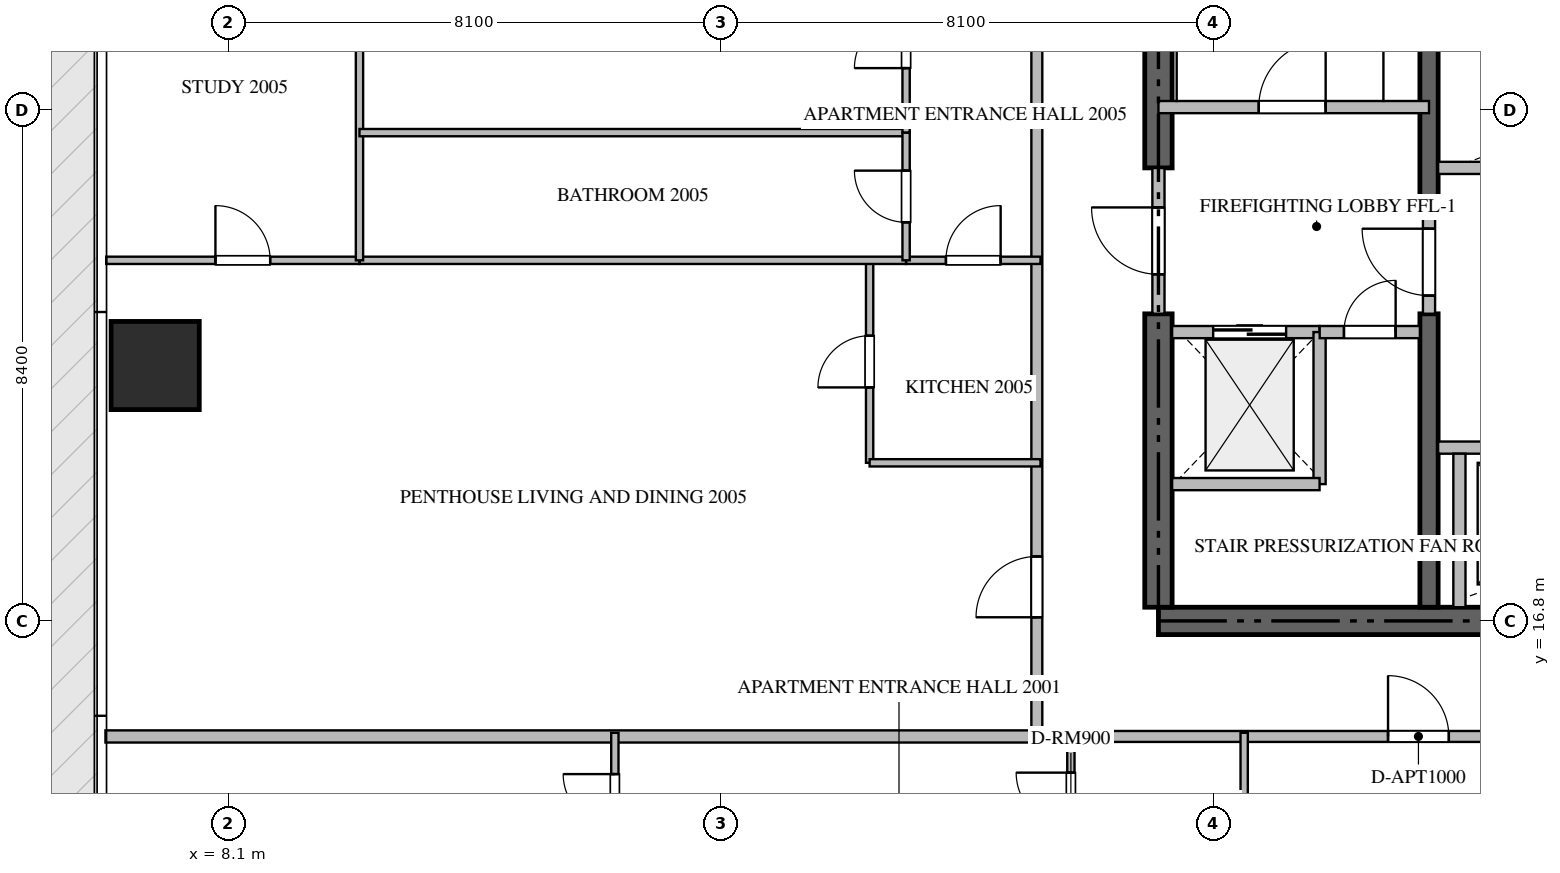
"""IFC4 building model, lengths in metres.
Left out: names, types, materials, properties, quantities, classifications, styles, units other than length and angle.
Written with IfcOpenShell. Run it as: python <this file> out.ifc"""

import sys

from ifc_helpers import new_model, si_unit, direction, frame, frame_2d, origin, origin_2d, place, context, subcontext, project, spatial, rectangle, extrude, source, transform, mapped, element, fill, save


model = new_model("IFC4")
c1 = context("Model", 3, precision=1e-05, world=origin(), true_north=direction((0.0, 1.0)))
c2 = subcontext(c1, "Body", "Model", "MODEL_VIEW")
j1 = project(units=[si_unit("LENGTHUNIT", "METRE"), si_unit("PLANEANGLEUNIT", "RADIAN")], contexts=[c1])
p1 = place(None, origin())
s1 = spatial("IfcSite", under=j1, at=p1, CompositionType="ELEMENT")
p2 = place(p1, origin())
s2 = spatial("IfcBuilding", under=s1, at=p2, CompositionType="ELEMENT")
p3 = place(p2, frame((0.0, 0.0, 82.95)))
s3 = spatial("IfcBuildingStorey", under=s2, at=p3, CompositionType="ELEMENT", Elevation=82.95)
p4 = place(p3, frame((23.4, 16.8, -0.26), z_axis=(0.0, 0.0, 1.0), x_axis=(1.0, 0.0, 0.0)))
e1 = element("IfcWall", 1, at=p4, inside=s3, PredefinedType="SHEAR", context=c2, shape_type="SweptSolid", body=[
    extrude(rectangle(XDim=18.0, YDim=0.45, at=frame_2d((9.0, 0.0))), origin(), (0.0, 0.0, 1.0), 3.748),
])
p5 = place(p3, frame((23.4, 17.025, -0.26), z_axis=(0.0, 0.0, 1.0), x_axis=(0.0, 1.0, 0.0)))
e2 = element("IfcWall", 2, at=p5, inside=s3, PredefinedType="SHEAR", context=c2, shape_type="SweptSolid", body=[
    extrude(rectangle(XDim=4.825, YDim=0.45, at=frame_2d((2.413, 0.0))), origin(), (0.0, 0.0, 1.0), 3.748),
])
p6 = place(p3, frame((23.4, 24.25, -0.26), z_axis=(0.0, 0.0, 1.0), x_axis=(0.0, 1.0, 0.0)))
e3 = element("IfcWall", 3, at=p6, inside=s3, PredefinedType="SHEAR", context=c2, shape_type="SweptSolid", body=[
    extrude(rectangle(XDim=9.125, YDim=0.45, at=frame_2d((4.562, 0.0))), origin(), (0.0, 0.0, 1.0), 3.748),
])
p7 = place(p3, frame((27.85, 17.025, -0.26), z_axis=(0.0, 0.0, 1.0), x_axis=(0.0, 1.0, 0.0)))
e4 = element("IfcWall", 4, at=p7, inside=s3, PredefinedType="SHEAR", context=c2, shape_type="SweptSolid", body=[
    extrude(rectangle(XDim=4.825, YDim=0.3, at=frame_2d((2.413, 0.0))), origin(), (0.0, 0.0, 1.0), 3.748),
])
p8 = place(p3, frame((27.85, 23.55, -0.26), z_axis=(0.0, 0.0, 1.0), x_axis=(0.0, 1.0, 0.0)))
e5 = element("IfcWall", 5, at=p8, inside=s3, PredefinedType="SHEAR", context=c2, shape_type="SweptSolid", body=[
    extrude(rectangle(XDim=9.825, YDim=0.3, at=frame_2d((4.913, 0.0))), origin(), (0.0, 0.0, 1.0), 3.748),
])
m1 = source(origin(), c2, "Body", "SweptSolid", [
    extrude(rectangle(XDim=1.45, YDim=1.45, at=origin_2d()), origin(), (0.0, 0.0, 1.0), 3.75),
])
p9 = place(p3, frame((6.9, 21.0, -0.26), z_axis=(0.0, 0.0, 1.0), x_axis=(1.0, 0.0, 0.0)))
e6 = element("IfcColumn", 6, at=p9, inside=s3, PredefinedType="COLUMN", context=c2, shape_type="MappedRepresentation", body=[
    mapped(m1, transform((0.0, 0.0, 0.0), scale=1.0)),
])
p10 = place(p3, frame((23.4, 25.25, 0.0), z_axis=(0.0, 0.0, 1.0), x_axis=(1.0, 0.0, 0.0)))
e7 = element("IfcWall", 7, at=p10, inside=s3, PredefinedType="STANDARD", context=c2, shape_type="SweptSolid", body=[
    extrude(rectangle(XDim=4.45, YDim=0.2, at=frame_2d((2.225, 0.0))), origin(), (0.0, 0.0, 1.0), 3.49),
])
p11 = place(p10, frame((1.65, 0.0, 0.0)))
e8 = element("IfcOpeningElement", 8, at=p11, cuts=e7, PredefinedType="OPENING", context=c2, shape_type="SweptSolid", body=[
    extrude(rectangle(XDim=1.1, YDim=2.15, at=frame_2d((0.55, 1.075))), frame((0.0, 0.11, 0.0), z_axis=(0.0, -1.0, 0.0), x_axis=(1.0, 0.0, 0.0)), (0.0, 0.0, 1.0), 0.22),
])
p12 = place(p3, frame((23.625, 21.55, 0.0), z_axis=(0.0, 0.0, 1.0), x_axis=(1.0, 0.0, 0.0)))
e9 = element("IfcWall", 9, at=p12, inside=s3, PredefinedType="STANDARD", context=c2, shape_type="SweptSolid", body=[
    extrude(rectangle(XDim=2.425, YDim=0.2, at=frame_2d((1.212, 0.0))), origin(), (0.0, 0.0, 1.0), 3.49),
])
p13 = place(p12, frame((0.675, 0.0, 0.0)))
e10 = element("IfcOpeningElement", 10, at=p13, cuts=e9, PredefinedType="OPENING", context=c2, shape_type="SweptSolid", body=[
    extrude(rectangle(XDim=1.2, YDim=2.2, at=frame_2d((0.6, 1.1))), frame((0.0, 0.11, 0.0), z_axis=(0.0, -1.0, 0.0), x_axis=(1.0, 0.0, 0.0)), (0.0, 0.0, 1.0), 0.22),
])
p14 = place(p3, frame((28.0, 19.65, 0.0), z_axis=(0.0, 0.0, 1.0), x_axis=(1.0, 0.0, 0.0)))
e11 = element("IfcWall", 11, at=p14, inside=s3, PredefinedType="STANDARD", context=c2, shape_type="SweptSolid", body=[
    extrude(rectangle(XDim=2.65, YDim=0.2, at=frame_2d((1.325, 0.0))), origin(), (0.0, 0.0, 1.0), 3.49),
])
p15 = place(p14, frame((0.9, 0.0, 0.0)))
e12 = element("IfcOpeningElement", 12, at=p15, cuts=e11, PredefinedType="OPENING", context=c2, shape_type="SweptSolid", body=[
    extrude(rectangle(XDim=1.1, YDim=2.2, at=frame_2d((0.55, 1.1))), frame((0.0, 0.11, 0.0), z_axis=(0.0, -1.0, 0.0), x_axis=(1.0, 0.0, 0.0)), (0.0, 0.0, 1.0), 0.22),
])
p16 = place(p3, frame((28.35, 17.025, 0.0), z_axis=(0.0, 0.0, 1.0), x_axis=(0.0, 1.0, 0.0)))
e13 = element("IfcWall", 13, at=p16, inside=s3, PredefinedType="STANDARD", context=c2, shape_type="SweptSolid", body=[
    extrude(rectangle(XDim=2.525, YDim=0.2, at=frame_2d((1.263, 0.0))), origin(), (0.0, 0.0, 1.0), 3.49),
])
p17 = place(p3, frame((28.0, 24.25, 0.0), z_axis=(0.0, 0.0, 1.0), x_axis=(1.0, 0.0, 0.0)))
e14 = element("IfcWall", 14, at=p17, inside=s3, PredefinedType="STANDARD", context=c2, shape_type="SweptSolid", body=[
    extrude(rectangle(XDim=2.425, YDim=0.2, at=frame_2d((1.212, 0.0))), origin(), (0.0, 0.0, 1.0), 3.49),
])
p18 = place(p3, frame((26.05, 19.05, 0.0), z_axis=(0.0, 0.0, 1.0), x_axis=(0.0, 1.0, 0.0)))
e15 = element("IfcWall", 15, at=p18, inside=s3, PredefinedType="STANDARD", context=c2, shape_type="SweptSolid", body=[
    extrude(rectangle(XDim=2.5, YDim=0.2, at=frame_2d((1.25, 0.0))), origin(), (0.0, 0.0, 1.0), 3.49),
])
p19 = place(p3, frame((23.625, 19.05, 0.0), z_axis=(0.0, 0.0, 1.0), x_axis=(1.0, 0.0, 0.0)))
e16 = element("IfcWall", 16, at=p19, inside=s3, PredefinedType="STANDARD", context=c2, shape_type="SweptSolid", body=[
    extrude(rectangle(XDim=2.425, YDim=0.2, at=frame_2d((1.212, 0.0))), origin(), (0.0, 0.0, 1.0), 3.49),
])
p20 = place(p3, frame((26.052, 21.55, 0.0), z_axis=(0.0, 0.0, 1.0), x_axis=(1.0, 0.0, 0.0)))
e17 = element("IfcWall", 17, at=p20, inside=s3, PredefinedType="STANDARD", context=c2, shape_type="SweptSolid", body=[
    extrude(rectangle(XDim=1.648, YDim=0.2, at=frame_2d((0.824, 0.0))), origin(), (0.0, 0.0, 1.0), 3.49),
])
p21 = place(p20, frame((0.399, 0.0, 0.0)))
e18 = element("IfcOpeningElement", 18, at=p21, cuts=e17, PredefinedType="OPENING", context=c2, shape_type="SweptSolid", body=[
    extrude(rectangle(XDim=0.85, YDim=2.1, at=frame_2d((0.425, 1.05))), frame((0.0, 0.11, 0.0), z_axis=(0.0, -1.0, 0.0), x_axis=(1.0, 0.0, 0.0)), (0.0, 0.0, 1.0), 0.22),
])
p22 = place(p3, frame((23.4, 21.852, 0.0), z_axis=(0.0, 0.0, 1.0), x_axis=(0.0, 1.0, 0.0)))
e19 = element("IfcWall", 19, at=p22, inside=s3, PredefinedType="STANDARD", context=c2, shape_type="SweptSolid", body=[
    extrude(rectangle(XDim=2.396, YDim=0.2, at=frame_2d((1.198, 0.0))), origin(), (0.0, 0.0, 1.0), 3.49),
])
p23 = place(p22, frame((0.648, 0.0, 0.0)))
e20 = element("IfcOpeningElement", 20, at=p23, cuts=e19, PredefinedType="OPENING", context=c2, shape_type="SweptSolid", body=[
    extrude(rectangle(XDim=1.1, YDim=2.15, at=frame_2d((0.55, 1.075))), frame((0.0, 0.11, 0.0), z_axis=(0.0, -1.0, 0.0), x_axis=(1.0, 0.0, 0.0)), (0.0, 0.0, 1.0), 0.22),
])
p24 = place(p3, frame((27.85, 21.852, 0.0), z_axis=(0.0, 0.0, 1.0), x_axis=(0.0, 1.0, 0.0)))
e21 = element("IfcWall", 21, at=p24, inside=s3, PredefinedType="STANDARD", context=c2, shape_type="SweptSolid", body=[
    extrude(rectangle(XDim=1.696, YDim=0.2, at=frame_2d((0.848, 0.0))), origin(), (0.0, 0.0, 1.0), 3.49),
])
p25 = place(p24, frame((0.298, 0.0, 0.0)))
e22 = element("IfcOpeningElement", 22, at=p25, cuts=e21, PredefinedType="OPENING", context=c2, shape_type="SweptSolid", body=[
    extrude(rectangle(XDim=1.1, YDim=2.15, at=frame_2d((0.55, 1.075))), frame((0.0, 0.11, 0.0), z_axis=(0.0, -1.0, 0.0), x_axis=(1.0, 0.0, 0.0)), (0.0, 0.0, 1.0), 0.22),
])
p26 = place(p3, frame((6.082, 14.9, 0.0), z_axis=(0.0, 0.0, 1.0), x_axis=(1.0, 0.0, 0.0)))
e23 = element("IfcWall", 23, at=p26, inside=s3, PredefinedType="PARTITIONING", context=c2, shape_type="SweptSolid", body=[
    extrude(rectangle(XDim=15.318, YDim=0.2, at=frame_2d((7.659, 0.0))), origin(), (0.0, 0.0, 1.0), 3.49),
])
p27 = place(p3, frame((21.402, 14.9, 0.0), z_axis=(0.0, 0.0, 1.0), x_axis=(1.0, 0.0, 0.0)))
e24 = element("IfcWall", 24, at=p27, inside=s3, PredefinedType="PARTITIONING", context=c2, shape_type="SweptSolid", body=[
    extrude(rectangle(XDim=21.996, YDim=0.18, at=frame_2d((10.998, 0.0))), origin(), (0.0, 0.0, 1.0), 3.49),
])
p28 = place(p27, frame((5.774, 0.0, 0.0)))
e25 = element("IfcOpeningElement", 25, at=p28, cuts=e24, PredefinedType="OPENING", context=c2, shape_type="SweptSolid", body=[
    extrude(rectangle(XDim=1.0, YDim=2.15, at=frame_2d((0.5, 1.075))), frame((0.0, 0.1, 0.0), z_axis=(0.0, -1.0, 0.0), x_axis=(1.0, 0.0, 0.0)), (0.0, 0.0, 1.0), 0.2),
])
p29 = place(p27, frame((16.272, 0.0, 0.0)))
e26 = element("IfcOpeningElement", 26, at=p29, cuts=e24, PredefinedType="OPENING", context=c2, shape_type="SweptSolid", body=[
    extrude(rectangle(XDim=1.0, YDim=2.15, at=frame_2d((0.5, 1.075))), frame((0.0, 0.1, 0.0), z_axis=(0.0, -1.0, 0.0), x_axis=(1.0, 0.0, 0.0)), (0.0, 0.0, 1.0), 0.2),
])
p30 = place(p3, frame((21.4, 14.9, 0.0), z_axis=(0.0, 0.0, 1.0), x_axis=(0.0, 1.0, 0.0)))
e27 = element("IfcWall", 27, at=p30, inside=s3, PredefinedType="PARTITIONING", context=c2, shape_type="SweptSolid", body=[
    extrude(rectangle(XDim=20.6, YDim=0.18, at=frame_2d((10.3, 0.0))), origin(), (0.0, 0.0, 1.0), 3.49),
])
p31 = place(p30, frame((1.96, 0.0, 0.0)))
e28 = element("IfcOpeningElement", 28, at=p31, cuts=e27, PredefinedType="OPENING", context=c2, shape_type="SweptSolid", body=[
    extrude(rectangle(XDim=1.0, YDim=2.15, at=frame_2d((0.5, 1.075))), frame((0.0, 0.1, 0.0), z_axis=(0.0, -1.0, 0.0), x_axis=(1.0, 0.0, 0.0)), (0.0, 0.0, 1.0), 0.2),
])
p32 = place(p3, frame((24.81, 12.15, 0.0), z_axis=(0.0, 0.0, 1.0), x_axis=(0.0, 1.0, 0.0)))
e29 = element("IfcWall", 29, at=p32, inside=s3, PredefinedType="PARTITIONING", context=c2, shape_type="SweptSolid", body=[
    extrude(rectangle(XDim=2.81, YDim=0.12, at=frame_2d((1.405, 0.0))), origin(), (0.0, 0.0, 1.0), 3.49),
])
p33 = place(p3, frame((21.96, 12.75, 0.0), z_axis=(0.0, 0.0, 1.0), x_axis=(0.0, 1.0, 0.0)))
e30 = element("IfcWall", 30, at=p33, inside=s3, PredefinedType="PARTITIONING", context=c2, shape_type="SweptSolid", body=[
    extrude(rectangle(XDim=2.21, YDim=0.12, at=frame_2d((1.105, 0.0))), origin(), (0.0, 0.0, 1.0), 3.49),
])
p34 = place(p33, frame((0.655, 0.0, 0.0)))
e31 = element("IfcOpeningElement", 31, at=p34, cuts=e30, PredefinedType="OPENING", context=c2, shape_type="SweptSolid", body=[
    extrude(rectangle(XDim=0.9, YDim=2.1, at=frame_2d((0.45, 1.05))), frame((0.0, 0.07, 0.0), z_axis=(0.0, -1.0, 0.0), x_axis=(1.0, 0.0, 0.0)), (0.0, 0.0, 1.0), 0.14),
])
p35 = place(p3, frame((14.46, 12.752, 0.0), z_axis=(0.0, 0.0, 1.0), x_axis=(0.0, 1.0, 0.0)))
e32 = element("IfcWall", 32, at=p35, inside=s3, PredefinedType="PARTITIONING", context=c2, shape_type="SweptSolid", body=[
    extrude(rectangle(XDim=2.208, YDim=0.12, at=frame_2d((1.104, 0.0))), origin(), (0.0, 0.0, 1.0), 3.49),
])
p36 = place(p35, frame((0.679, 0.0, 0.0)))
e33 = element("IfcOpeningElement", 33, at=p36, cuts=e32, PredefinedType="OPENING", context=c2, shape_type="SweptSolid", body=[
    extrude(rectangle(XDim=0.85, YDim=2.1, at=frame_2d((0.425, 1.05))), frame((0.0, 0.07, 0.0), z_axis=(0.0, -1.0, 0.0), x_axis=(1.0, 0.0, 0.0)), (0.0, 0.0, 1.0), 0.14),
])
p37 = place(p3, frame((18.65, 19.4, 0.0), z_axis=(0.0, 0.0, 1.0), x_axis=(0.0, 1.0, 0.0)))
e34 = element("IfcWall", 34, at=p37, inside=s3, PredefinedType="PARTITIONING", context=c2, shape_type="SweptSolid", body=[
    extrude(rectangle(XDim=3.33, YDim=0.12, at=frame_2d((1.665, 0.0))), origin(), (0.0, 0.0, 1.0), 3.49),
])
p38 = place(p37, frame((1.24, 0.0, 0.0)))
e35 = element("IfcOpeningElement", 35, at=p38, cuts=e34, PredefinedType="OPENING", context=c2, shape_type="SweptSolid", body=[
    extrude(rectangle(XDim=0.85, YDim=2.1, at=frame_2d((0.425, 1.05))), frame((0.0, 0.07, 0.0), z_axis=(0.0, -1.0, 0.0), x_axis=(1.0, 0.0, 0.0)), (0.0, 0.0, 1.0), 0.14),
])
p39 = place(p3, frame((18.65, 19.4, 0.0), z_axis=(0.0, 0.0, 1.0), x_axis=(1.0, 0.0, 0.0)))
e36 = element("IfcWall", 36, at=p39, inside=s3, PredefinedType="PARTITIONING", context=c2, shape_type="SweptSolid", body=[
    extrude(rectangle(XDim=2.81, YDim=0.12, at=frame_2d((1.405, 0.0))), origin(), (0.0, 0.0, 1.0), 3.49),
])
p40 = place(p3, frame((19.25, 22.73, 0.0), z_axis=(0.0, 0.0, 1.0), x_axis=(1.0, 0.0, 0.0)))
e37 = element("IfcWall", 37, at=p40, inside=s3, PredefinedType="PARTITIONING", context=c2, shape_type="SweptSolid", body=[
    extrude(rectangle(XDim=2.21, YDim=0.12, at=frame_2d((1.105, 0.0))), origin(), (0.0, 0.0, 1.0), 3.49),
])
p41 = place(p40, frame((0.655, 0.0, 0.0)))
e38 = element("IfcOpeningElement", 38, at=p41, cuts=e37, PredefinedType="OPENING", context=c2, shape_type="SweptSolid", body=[
    extrude(rectangle(XDim=0.9, YDim=2.1, at=frame_2d((0.45, 1.05))), frame((0.0, 0.07, 0.0), z_axis=(0.0, -1.0, 0.0), x_axis=(1.0, 0.0, 0.0)), (0.0, 0.0, 1.0), 0.14),
])
p42 = place(p3, frame((6.095, 22.73, 0.0), z_axis=(0.0, 0.0, 1.0), x_axis=(1.0, 0.0, 0.0)))
e39 = element("IfcWall", 39, at=p42, inside=s3, PredefinedType="PARTITIONING", context=c2, shape_type="SweptSolid", body=[
    extrude(rectangle(XDim=4.165, YDim=0.12, at=frame_2d((2.083, 0.0))), origin(), (0.0, 0.0, 1.0), 3.49),
])
p43 = place(p42, frame((1.796, 0.0, 0.0)))
e40 = element("IfcOpeningElement", 40, at=p43, cuts=e39, PredefinedType="OPENING", context=c2, shape_type="SweptSolid", body=[
    extrude(rectangle(XDim=0.9, YDim=2.1, at=frame_2d((0.45, 1.05))), frame((0.0, 0.07, 0.0), z_axis=(0.0, -1.0, 0.0), x_axis=(1.0, 0.0, 0.0)), (0.0, 0.0, 1.0), 0.14),
])
p44 = place(p3, frame((10.262, 22.73, 0.0), z_axis=(0.0, 0.0, 1.0), x_axis=(1.0, 0.0, 0.0)))
e41 = element("IfcWall", 41, at=p44, inside=s3, PredefinedType="PARTITIONING", context=c2, shape_type="SweptSolid", body=[
    extrude(rectangle(XDim=8.986, YDim=0.12, at=frame_2d((4.493, 0.0))), origin(), (0.0, 0.0, 1.0), 3.49),
])
p45 = place(p3, frame((10.26, 22.73, 0.0), z_axis=(0.0, 0.0, 1.0), x_axis=(0.0, 1.0, 0.0)))
e42 = element("IfcWall", 42, at=p45, inside=s3, PredefinedType="PARTITIONING", context=c2, shape_type="SweptSolid", body=[
    extrude(rectangle(XDim=5.07, YDim=0.12, at=frame_2d((2.535, 0.0))), origin(), (0.0, 0.0, 1.0), 3.49),
])
p46 = place(p3, frame((10.26, 24.83, 0.0), z_axis=(0.0, 0.0, 1.0), x_axis=(1.0, 0.0, 0.0)))
e43 = element("IfcWall", 43, at=p46, inside=s3, PredefinedType="PARTITIONING", context=c2, shape_type="SweptSolid", body=[
    extrude(rectangle(XDim=8.99, YDim=0.12, at=frame_2d((4.495, 0.0))), origin(), (0.0, 0.0, 1.0), 3.49),
])
p47 = place(p3, frame((19.25, 22.73, 0.0), z_axis=(0.0, 0.0, 1.0), x_axis=(0.0, 1.0, 0.0)))
e44 = element("IfcWall", 44, at=p47, inside=s3, PredefinedType="PARTITIONING", context=c2, shape_type="SweptSolid", body=[
    extrude(rectangle(XDim=2.1, YDim=0.12, at=frame_2d((1.05, 0.0))), origin(), (0.0, 0.0, 1.0), 3.49),
])
p48 = place(p47, frame((0.625, 0.0, 0.0)))
e45 = element("IfcOpeningElement", 45, at=p48, cuts=e44, PredefinedType="OPENING", context=c2, shape_type="SweptSolid", body=[
    extrude(rectangle(XDim=0.85, YDim=2.1, at=frame_2d((0.425, 1.05))), frame((0.0, 0.07, 0.0), z_axis=(0.0, -1.0, 0.0), x_axis=(1.0, 0.0, 0.0)), (0.0, 0.0, 1.0), 0.14),
])
p49 = place(p3, frame((19.25, 24.832, 0.0), z_axis=(0.0, 0.0, 1.0), x_axis=(0.0, 1.0, 0.0)))
e46 = element("IfcWall", 46, at=p49, inside=s3, PredefinedType="PARTITIONING", context=c2, shape_type="SweptSolid", body=[
    extrude(rectangle(XDim=2.968, YDim=0.12, at=frame_2d((1.484, 0.0))), origin(), (0.0, 0.0, 1.0), 3.49),
])
p50 = place(p49, frame((1.059, 0.0, 0.0)))
e47 = element("IfcOpeningElement", 47, at=p50, cuts=e46, PredefinedType="OPENING", context=c2, shape_type="SweptSolid", body=[
    extrude(rectangle(XDim=0.85, YDim=2.1, at=frame_2d((0.425, 1.05))), frame((0.0, 0.07, 0.0), z_axis=(0.0, -1.0, 0.0), x_axis=(1.0, 0.0, 0.0)), (0.0, 0.0, 1.0), 0.14),
])
m2 = source(origin(), c2, "Body", "SweptSolid", [
    extrude(rectangle(XDim=1.1, YDim=2.15, at=frame_2d((0.55, 1.075))), frame((0.0, 0.025, 0.0), z_axis=(0.0, -1.0, 0.0), x_axis=(1.0, 0.0, 0.0)), (0.0, 0.0, 1.0), 0.05),
])
p51 = place(p11, origin())
e48 = element("IfcDoor", 48, at=p51, inside=s3, OperationType="SINGLE_SWING_RIGHT", PredefinedType="DOOR", context=c2, shape_type="MappedRepresentation", body=[
    mapped(m2, transform((0.0, 0.0, 0.0), scale=1.0)),
])
fill(e8, e48)
m3 = source(origin(), c2, "Body", "SweptSolid", [
    extrude(rectangle(XDim=1.2, YDim=2.2, at=frame_2d((0.6, 1.1))), frame((0.0, 0.025, 0.0), z_axis=(0.0, -1.0, 0.0), x_axis=(1.0, 0.0, 0.0)), (0.0, 0.0, 1.0), 0.05),
])
p52 = place(p13, origin())
e49 = element("IfcDoor", 49, at=p52, inside=s3, OperationType="DOUBLE_DOOR_SLIDING", PredefinedType="DOOR", context=c2, shape_type="MappedRepresentation", body=[
    mapped(m3, transform((0.0, 0.0, 0.0), scale=1.0)),
])
fill(e10, e49)
m4 = source(origin(), c2, "Body", "SweptSolid", [
    extrude(rectangle(XDim=0.85, YDim=2.1, at=frame_2d((0.425, 1.05))), frame((0.0, 0.025, 0.0), z_axis=(0.0, -1.0, 0.0), x_axis=(1.0, 0.0, 0.0)), (0.0, 0.0, 1.0), 0.05),
])
p53 = place(p21, origin())
e50 = element("IfcDoor", 50, at=p53, inside=s3, OperationType="SINGLE_SWING_RIGHT", PredefinedType="DOOR", context=c2, shape_type="MappedRepresentation", body=[
    mapped(m4, transform((0.0, 0.0, 0.0), scale=1.0)),
])
fill(e18, e50)
p54 = place(p23, origin())
e51 = element("IfcDoor", 51, at=p54, inside=s3, OperationType="SINGLE_SWING_RIGHT", PredefinedType="DOOR", context=c2, shape_type="MappedRepresentation", body=[
    mapped(m2, transform((0.0, 0.0, 0.0), scale=1.0)),
])
fill(e20, e51)
p55 = place(p25, origin())
e52 = element("IfcDoor", 52, at=p55, inside=s3, OperationType="SINGLE_SWING_RIGHT", PredefinedType="DOOR", context=c2, shape_type="MappedRepresentation", body=[
    mapped(m2, transform((0.0, 0.0, 0.0), scale=1.0)),
])
fill(e22, e52)
m5 = source(origin(), c2, "Body", "SweptSolid", [
    extrude(rectangle(XDim=1.0, YDim=2.15, at=frame_2d((0.5, 1.075))), frame((0.0, 0.025, 0.0), z_axis=(0.0, -1.0, 0.0), x_axis=(1.0, 0.0, 0.0)), (0.0, 0.0, 1.0), 0.05),
])
p56 = place(p28, origin())
e53 = element("IfcDoor", 53, at=p56, inside=s3, OperationType="SINGLE_SWING_LEFT", PredefinedType="DOOR", context=c2, shape_type="MappedRepresentation", body=[
    mapped(m5, transform((0.0, 0.0, 0.0), scale=1.0)),
])
fill(e25, e53)
p57 = place(p31, origin())
e54 = element("IfcDoor", 54, at=p57, inside=s3, OperationType="SINGLE_SWING_LEFT", PredefinedType="DOOR", context=c2, shape_type="MappedRepresentation", body=[
    mapped(m5, transform((0.0, 0.0, 0.0), scale=1.0)),
])
fill(e28, e54)
m6 = source(origin(), c2, "Body", "SweptSolid", [
    extrude(rectangle(XDim=0.9, YDim=2.1, at=frame_2d((0.45, 1.05))), frame((0.0, 0.025, 0.0), z_axis=(0.0, -1.0, 0.0), x_axis=(1.0, 0.0, 0.0)), (0.0, 0.0, 1.0), 0.05),
])
p58 = place(p34, origin())
e55 = element("IfcDoor", 55, at=p58, inside=s3, OperationType="SINGLE_SWING_RIGHT", PredefinedType="DOOR", context=c2, shape_type="MappedRepresentation", body=[
    mapped(m6, transform((0.0, 0.0, 0.0), scale=1.0)),
])
fill(e31, e55)
p59 = place(p36, origin())
e56 = element("IfcDoor", 56, at=p59, inside=s3, OperationType="SINGLE_SWING_RIGHT", PredefinedType="DOOR", context=c2, shape_type="MappedRepresentation", body=[
    mapped(m4, transform((0.0, 0.0, 0.0), scale=1.0)),
])
fill(e33, e56)
p60 = place(p38, origin())
e57 = element("IfcDoor", 57, at=p60, inside=s3, OperationType="SINGLE_SWING_LEFT", PredefinedType="DOOR", context=c2, shape_type="MappedRepresentation", body=[
    mapped(m4, transform((0.0, 0.0, 0.0), scale=1.0)),
])
fill(e35, e57)
p61 = place(p41, origin())
e58 = element("IfcDoor", 58, at=p61, inside=s3, OperationType="SINGLE_SWING_RIGHT", PredefinedType="DOOR", context=c2, shape_type="MappedRepresentation", body=[
    mapped(m6, transform((0.0, 0.0, 0.0), scale=1.0)),
])
fill(e38, e58)
p62 = place(p43, origin())
e59 = element("IfcDoor", 59, at=p62, inside=s3, OperationType="SINGLE_SWING_LEFT", PredefinedType="DOOR", context=c2, shape_type="MappedRepresentation", body=[
    mapped(m6, transform((0.0, 0.0, 0.0), scale=1.0)),
])
fill(e40, e59)
p63 = place(p48, origin())
e60 = element("IfcDoor", 60, at=p63, inside=s3, OperationType="SINGLE_SWING_RIGHT", PredefinedType="DOOR", context=c2, shape_type="MappedRepresentation", body=[
    mapped(m4, transform((0.0, 0.0, 0.0), scale=1.0)),
])
fill(e45, e60)
p64 = place(p50, origin())
e61 = element("IfcDoor", 61, at=p64, inside=s3, OperationType="SINGLE_SWING_LEFT", PredefinedType="DOOR", context=c2, shape_type="MappedRepresentation", body=[
    mapped(m4, transform((0.0, 0.0, 0.0), scale=1.0)),
])
fill(e47, e61)
save(model, sys.argv[1])
